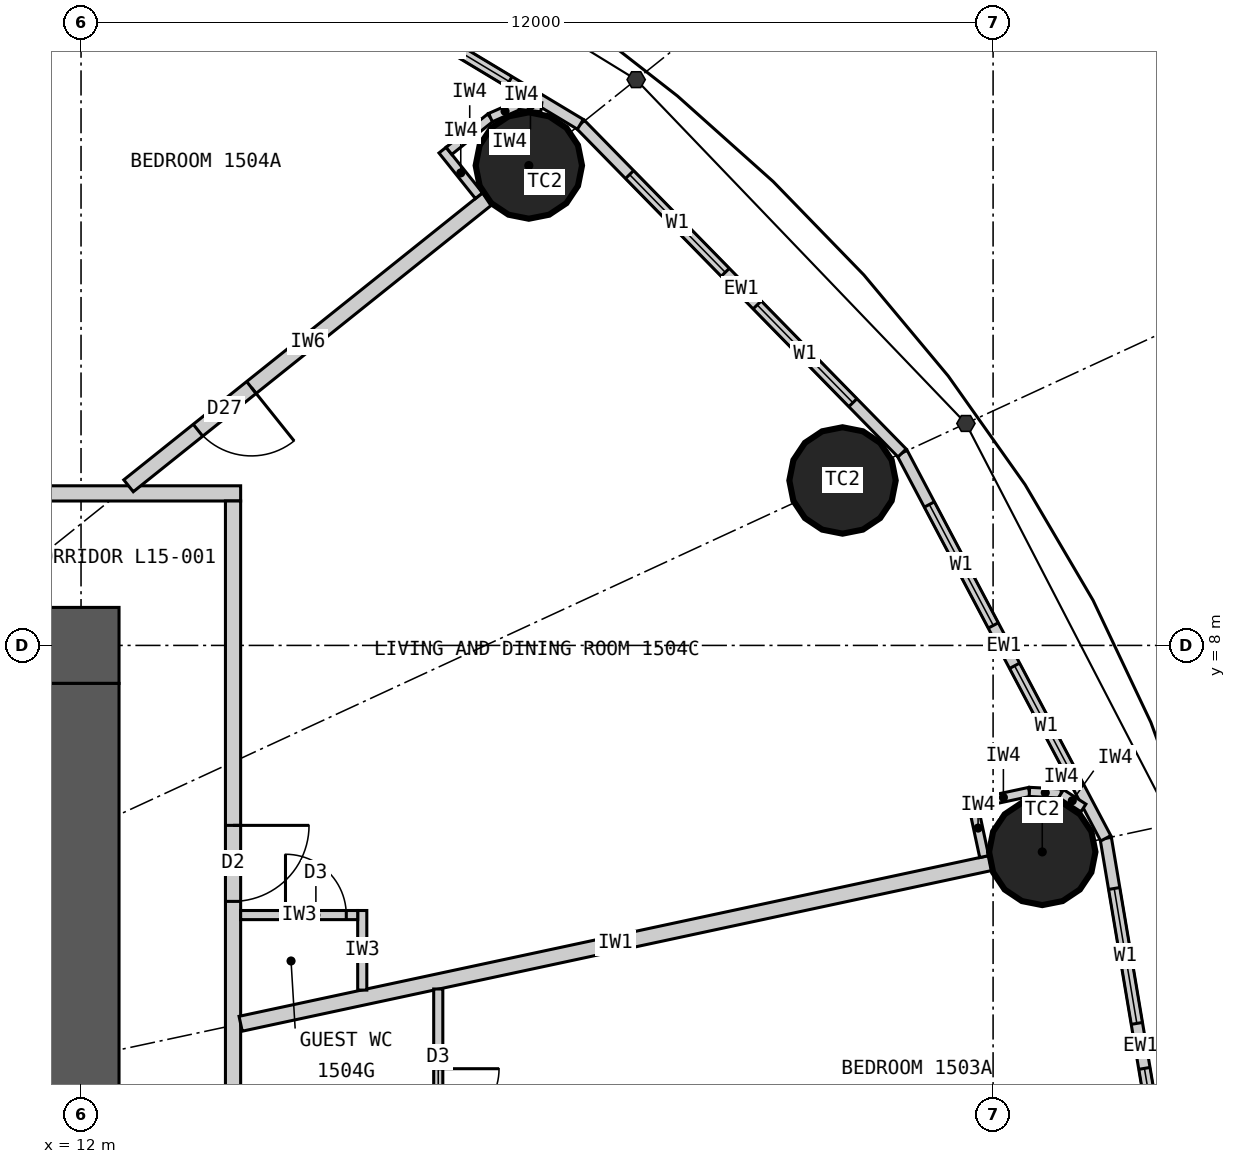
"""IFC4 building model, lengths in metres.
Left out: names, types, materials, properties, quantities, classifications, styles, units other than length and angle.
Written with IfcOpenShell. Run it as: python <this file> out.ifc"""

import sys

from ifc_helpers import new_model, si_unit, direction, frame, frame_2d, origin, origin_2d, place, context, subcontext, project, spatial, rectangle, circle, extrude, element, fill, save


model = new_model("IFC4")
c1 = context("Model", 3, precision=1e-05, world=origin(), true_north=direction((0.0, 1.0)))
c2 = subcontext(c1, "Body", "Model", "MODEL_VIEW")
j1 = project(units=[si_unit("LENGTHUNIT", "METRE"), si_unit("PLANEANGLEUNIT", "RADIAN")], contexts=[c1])
p1 = place(None, origin())
s1 = spatial("IfcSite", under=j1, at=p1, CompositionType="ELEMENT")
p2 = place(p1, origin())
s2 = spatial("IfcBuilding", under=s1, at=p2, CompositionType="ELEMENT")
p3 = place(p2, frame((0.0, 0.0, 63.9)))
s3 = spatial("IfcBuildingStorey", under=s2, at=p3, CompositionType="ELEMENT", Elevation=63.9)
for number, where, z_axis, x_axis in (
    (1, (24.647, 5.283, 0.0), (0.0, 0.0, 1.0), (1.0, 0.0, 0.0)),
    (2, (22.019, 10.17, 0.0), (0.0, 0.0, 1.0), (1.0, 0.0, 0.0)),
    (3, (17.892, 14.313, 0.0), (0.0, 0.0, 1.0), (1.0, 0.0, 0.0)),
):
    element("IfcColumn", number, at=place(p3, frame(where, z_axis=z_axis, x_axis=x_axis)), inside=s3, PredefinedType="COLUMN", context=c2, shape_type="SweptSolid", body=[
        extrude(circle(Radius=0.7, at=origin_2d()), origin(), (0.0, 0.0, 1.0), 3.3),
    ])
p4 = place(p3, frame((-12.5, 8.0, 0.0), z_axis=(0.0, 0.0, 1.0), x_axis=(1.0, 0.0, 0.0)))
e4 = element("IfcWall", 4, at=p4, inside=s3, PredefinedType="SHEAR", context=c2, shape_type="SweptSolid", body=[
    extrude(rectangle(XDim=25.0, YDim=1.0, at=frame_2d((12.5, 0.0))), origin(), (0.0, 0.0, 1.0), 3.3),
])
p5 = place(p4, frame((11.2, 0.0, 0.0)))
e5 = element("IfcOpeningElement", 5, at=p5, cuts=e4, PredefinedType="OPENING", context=c2, shape_type="SweptSolid", body=[
    extrude(rectangle(XDim=1.2, YDim=2.2, at=frame_2d((0.6, 1.1))), frame((0.0, 0.51, 0.0), z_axis=(0.0, -1.0, 0.0), x_axis=(1.0, 0.0, 0.0)), (0.0, 0.0, 1.0), 1.02),
])
p6 = place(p4, frame((18.8, 0.0, 0.0)))
e6 = element("IfcOpeningElement", 6, at=p6, cuts=e4, PredefinedType="OPENING", context=c2, shape_type="SweptSolid", body=[
    extrude(rectangle(XDim=0.9, YDim=2.2, at=frame_2d((0.45, 1.1))), frame((0.0, 0.51, 0.0), z_axis=(0.0, -1.0, 0.0), x_axis=(1.0, 0.0, 0.0)), (0.0, 0.0, 1.0), 1.02),
])
p7 = place(p3, frame((12.0, -7.5, 0.0), z_axis=(0.0, 0.0, 1.0), x_axis=(0.0, 1.0, 0.0)))
e7 = element("IfcWall", 7, at=p7, inside=s3, PredefinedType="SHEAR", context=c2, shape_type="SweptSolid", body=[
    extrude(rectangle(XDim=15.0, YDim=1.0, at=frame_2d((7.5, 0.0))), origin(), (0.0, 0.0, 1.0), 3.3),
])
p8 = place(p7, frame((6.6, 0.0, 0.0)))
e8 = element("IfcOpeningElement", 8, at=p8, cuts=e7, PredefinedType="OPENING", context=c2, shape_type="SweptSolid", body=[
    extrude(rectangle(XDim=1.8, YDim=2.2, at=frame_2d((0.9, 1.1))), frame((0.0, 0.51, 0.0), z_axis=(0.0, -1.0, 0.0), x_axis=(1.0, 0.0, 0.0)), (0.0, 0.0, 1.0), 1.02),
])
p9 = place(p3, frame((26.4, 0.0, 0.0), z_axis=(0.0, 0.0, 1.0), x_axis=(-0.165642551694, 0.986185857264, 0.0)))
e9 = element("IfcWall", 9, at=p9, inside=s3, PredefinedType="ELEMENTEDWALL", context=c2, shape_type="SweptSolid", body=[
    extrude(rectangle(XDim=5.539, YDim=0.15, at=frame_2d((2.77, 0.0))), origin(), (0.0, 0.0, 1.0), 3.12),
])
p10 = place(p9, frame((0.669, 0.0, 0.9)))
e10 = element("IfcOpeningElement", 10, at=p10, cuts=e9, PredefinedType="OPENING", context=c2, shape_type="SweptSolid", body=[
    extrude(rectangle(XDim=1.8, YDim=1.9, at=frame_2d((0.9, 0.95))), frame((0.0, 0.085, 0.0), z_axis=(0.0, -1.0, 0.0), x_axis=(1.0, 0.0, 0.0)), (0.0, 0.0, 1.0), 0.17),
])
p11 = place(p9, frame((3.07, 0.0, 0.9)))
e11 = element("IfcOpeningElement", 11, at=p11, cuts=e9, PredefinedType="OPENING", context=c2, shape_type="SweptSolid", body=[
    extrude(rectangle(XDim=1.8, YDim=1.9, at=frame_2d((0.9, 0.95))), frame((0.0, 0.085, 0.0), z_axis=(0.0, -1.0, 0.0), x_axis=(1.0, 0.0, 0.0)), (0.0, 0.0, 1.0), 0.17),
])
p12 = place(p3, frame((25.482, 5.462, 0.0), z_axis=(0.0, 0.0, 1.0), x_axis=(-0.467296867008, 0.884100468321, 0.0)))
e12 = element("IfcWall", 12, at=p12, inside=s3, PredefinedType="ELEMENTEDWALL", context=c2, shape_type="SweptSolid", body=[
    extrude(rectangle(XDim=5.734, YDim=0.15, at=frame_2d((2.867, 0.0))), origin(), (0.0, 0.0, 1.0), 3.12),
])
p13 = place(p12, frame((0.767, 0.0, 0.9)))
e13 = element("IfcOpeningElement", 13, at=p13, cuts=e12, PredefinedType="OPENING", context=c2, shape_type="SweptSolid", body=[
    extrude(rectangle(XDim=1.8, YDim=1.9, at=frame_2d((0.9, 0.95))), frame((0.0, 0.085, 0.0), z_axis=(0.0, -1.0, 0.0), x_axis=(1.0, 0.0, 0.0)), (0.0, 0.0, 1.0), 0.17),
])
p14 = place(p12, frame((3.167, 0.0, 0.9)))
e14 = element("IfcOpeningElement", 14, at=p14, cuts=e12, PredefinedType="OPENING", context=c2, shape_type="SweptSolid", body=[
    extrude(rectangle(XDim=1.8, YDim=1.9, at=frame_2d((0.9, 0.95))), frame((0.0, 0.085, 0.0), z_axis=(0.0, -1.0, 0.0), x_axis=(1.0, 0.0, 0.0)), (0.0, 0.0, 1.0), 0.17),
])
p15 = place(p3, frame((22.803, 10.532, 0.0), z_axis=(0.0, 0.0, 1.0), x_axis=(-0.699602905915, 0.714531856557, 0.0)))
e15 = element("IfcWall", 15, at=p15, inside=s3, PredefinedType="ELEMENTEDWALL", context=c2, shape_type="SweptSolid", body=[
    extrude(rectangle(XDim=6.051, YDim=0.15, at=frame_2d((3.025, 0.0))), origin(), (0.0, 0.0, 1.0), 3.12),
])
p16 = place(p15, frame((0.926, 0.0, 0.9)))
e16 = element("IfcOpeningElement", 16, at=p16, cuts=e15, PredefinedType="OPENING", context=c2, shape_type="SweptSolid", body=[
    extrude(rectangle(XDim=1.8, YDim=1.9, at=frame_2d((0.9, 0.95))), frame((0.0, 0.085, 0.0), z_axis=(0.0, -1.0, 0.0), x_axis=(1.0, 0.0, 0.0)), (0.0, 0.0, 1.0), 0.17),
])
p17 = place(p15, frame((3.325, 0.0, 0.9)))
e17 = element("IfcOpeningElement", 17, at=p17, cuts=e15, PredefinedType="OPENING", context=c2, shape_type="SweptSolid", body=[
    extrude(rectangle(XDim=1.8, YDim=1.9, at=frame_2d((0.9, 0.95))), frame((0.0, 0.085, 0.0), z_axis=(0.0, -1.0, 0.0), x_axis=(1.0, 0.0, 0.0)), (0.0, 0.0, 1.0), 0.17),
])
p18 = place(p3, frame((18.57, 14.856, 0.0), z_axis=(0.0, 0.0, 1.0), x_axis=(-0.856983180864, 0.515344377787, 0.0)))
e18 = element("IfcWall", 18, at=p18, inside=s3, PredefinedType="ELEMENTEDWALL", context=c2, shape_type="SweptSolid", body=[
    extrude(rectangle(XDim=6.386, YDim=0.15, at=frame_2d((3.193, 0.0))), origin(), (0.0, 0.0, 1.0), 3.12),
])
p19 = place(p18, frame((1.093, 0.0, 0.9)))
e19 = element("IfcOpeningElement", 19, at=p19, cuts=e18, PredefinedType="OPENING", context=c2, shape_type="SweptSolid", body=[
    extrude(rectangle(XDim=1.8, YDim=1.9, at=frame_2d((0.9, 0.95))), frame((0.0, 0.085, 0.0), z_axis=(0.0, -1.0, 0.0), x_axis=(1.0, 0.0, 0.0)), (0.0, 0.0, 1.0), 0.17),
])
p20 = place(p18, frame((3.493, 0.0, 0.9)))
e20 = element("IfcOpeningElement", 20, at=p20, cuts=e18, PredefinedType="OPENING", context=c2, shape_type="SweptSolid", body=[
    extrude(rectangle(XDim=1.8, YDim=1.9, at=frame_2d((0.9, 0.95))), frame((0.0, 0.085, 0.0), z_axis=(0.0, -1.0, 0.0), x_axis=(1.0, 0.0, 0.0)), (0.0, 0.0, 1.0), 0.17),
])
p21 = place(p3, frame((-14.1, 10.0, 0.0), z_axis=(0.0, 0.0, 1.0), x_axis=(1.0, 0.0, 0.0)))
e21 = element("IfcWall", 21, at=p21, inside=s3, PredefinedType="PARTITIONING", context=c2, shape_type="SweptSolid", body=[
    extrude(rectangle(XDim=28.2, YDim=0.2, at=frame_2d((14.1, 0.0))), origin(), (0.0, 0.0, 1.0), 3.12),
])
p22 = place(p21, frame((18.529, 0.0, 0.0)))
e22 = element("IfcOpeningElement", 22, at=p22, cuts=e21, PredefinedType="OPENING", context=c2, shape_type="SweptSolid", body=[
    extrude(rectangle(XDim=1.0, YDim=2.2, at=frame_2d((0.5, 1.1))), frame((0.0, 0.11, 0.0), z_axis=(0.0, -1.0, 0.0), x_axis=(1.0, 0.0, 0.0)), (0.0, 0.0, 1.0), 0.22),
])
p23 = place(p21, frame((14.623, 0.0, 0.0)))
e23 = element("IfcOpeningElement", 23, at=p23, cuts=e21, PredefinedType="OPENING", context=c2, shape_type="SweptSolid", body=[
    extrude(rectangle(XDim=1.0, YDim=2.2, at=frame_2d((0.5, 1.1))), frame((0.0, 0.11, 0.0), z_axis=(0.0, -1.0, 0.0), x_axis=(1.0, 0.0, 0.0)), (0.0, 0.0, 1.0), 0.22),
])
p24 = place(p21, frame((11.24, 0.0, 0.0)))
e24 = element("IfcOpeningElement", 24, at=p24, cuts=e21, PredefinedType="OPENING", context=c2, shape_type="SweptSolid", body=[
    extrude(rectangle(XDim=1.0, YDim=2.2, at=frame_2d((0.5, 1.1))), frame((0.0, 0.11, 0.0), z_axis=(0.0, -1.0, 0.0), x_axis=(1.0, 0.0, 0.0)), (0.0, 0.0, 1.0), 0.22),
])
p25 = place(p21, frame((8.671, 0.0, 0.0)))
e25 = element("IfcOpeningElement", 25, at=p25, cuts=e21, PredefinedType="OPENING", context=c2, shape_type="SweptSolid", body=[
    extrude(rectangle(XDim=1.0, YDim=2.2, at=frame_2d((0.5, 1.1))), frame((0.0, 0.11, 0.0), z_axis=(0.0, -1.0, 0.0), x_axis=(1.0, 0.0, 0.0)), (0.0, 0.0, 1.0), 0.22),
])
p26 = place(p21, frame((2.801, 0.0, 0.0)))
e26 = element("IfcOpeningElement", 26, at=p26, cuts=e21, PredefinedType="OPENING", context=c2, shape_type="SweptSolid", body=[
    extrude(rectangle(XDim=1.0, YDim=2.2, at=frame_2d((0.5, 1.1))), frame((0.0, 0.11, 0.0), z_axis=(0.0, -1.0, 0.0), x_axis=(1.0, 0.0, 0.0)), (0.0, 0.0, 1.0), 0.22),
])
p27 = place(p3, frame((14.0, -9.9, 0.0), z_axis=(0.0, 0.0, 1.0), x_axis=(0.0, 1.0, 0.0)))
e27 = element("IfcWall", 27, at=p27, inside=s3, PredefinedType="PARTITIONING", context=c2, shape_type="SweptSolid", body=[
    extrude(rectangle(XDim=19.8, YDim=0.2, at=frame_2d((9.9, 0.0))), origin(), (0.0, 0.0, 1.0), 3.12),
])
p28 = place(p27, frame((0.103, 0.0, 0.0)))
e28 = element("IfcOpeningElement", 28, at=p28, cuts=e27, PredefinedType="OPENING", context=c2, shape_type="SweptSolid", body=[
    extrude(rectangle(XDim=1.0, YDim=2.2, at=frame_2d((0.5, 1.1))), frame((0.0, 0.11, 0.0), z_axis=(0.0, -1.0, 0.0), x_axis=(1.0, 0.0, 0.0)), (0.0, 0.0, 1.0), 0.22),
])
p29 = place(p27, frame((5.248, 0.0, 0.0)))
e29 = element("IfcOpeningElement", 29, at=p29, cuts=e27, PredefinedType="OPENING", context=c2, shape_type="SweptSolid", body=[
    extrude(rectangle(XDim=1.0, YDim=2.2, at=frame_2d((0.5, 1.1))), frame((0.0, 0.11, 0.0), z_axis=(0.0, -1.0, 0.0), x_axis=(1.0, 0.0, 0.0)), (0.0, 0.0, 1.0), 0.22),
])
p30 = place(p27, frame((8.438, 0.0, 0.0)))
e30 = element("IfcOpeningElement", 30, at=p30, cuts=e27, PredefinedType="OPENING", context=c2, shape_type="SweptSolid", body=[
    extrude(rectangle(XDim=1.0, YDim=2.2, at=frame_2d((0.5, 1.1))), frame((0.0, 0.11, 0.0), z_axis=(0.0, -1.0, 0.0), x_axis=(1.0, 0.0, 0.0)), (0.0, 0.0, 1.0), 0.22),
])
p31 = place(p27, frame((14.532, 0.0, 0.0)))
e31 = element("IfcOpeningElement", 31, at=p31, cuts=e27, PredefinedType="OPENING", context=c2, shape_type="SweptSolid", body=[
    extrude(rectangle(XDim=1.0, YDim=2.2, at=frame_2d((0.5, 1.1))), frame((0.0, 0.11, 0.0), z_axis=(0.0, -1.0, 0.0), x_axis=(1.0, 0.0, 0.0)), (0.0, 0.0, 1.0), 0.22),
])
p32 = place(p3, frame((14.1, 3.022, 0.0), z_axis=(0.0, 0.0, 1.0), x_axis=(0.977790014929, 0.209586943072, 0.0)))
e32 = element("IfcWall", 32, at=p32, inside=s3, PredefinedType="PARTITIONING", context=c2, shape_type="SweptSolid", body=[
    extrude(rectangle(XDim=10.087, YDim=0.2, at=frame_2d((5.043, 0.0))), origin(), (0.0, 0.0, 1.0), 2.32),
])
p33 = place(p3, frame((12.625, 10.1, 0.0), z_axis=(0.0, 0.0, 1.0), x_axis=(0.780892451574, 0.624665493744, 0.0)))
e33 = element("IfcWall", 33, at=p33, inside=s3, PredefinedType="PARTITIONING", context=c2, shape_type="SweptSolid", body=[
    extrude(rectangle(XDim=6.045, YDim=0.2, at=frame_2d((3.022, 0.0))), origin(), (0.0, 0.0, 1.0), 2.32),
])
p34 = place(p33, frame((1.17, 0.0, 0.0)))
e34 = element("IfcOpeningElement", 34, at=p34, cuts=e33, PredefinedType="OPENING", context=c2, shape_type="SweptSolid", body=[
    extrude(rectangle(XDim=0.9, YDim=2.1, at=frame_2d((0.45, 1.05))), frame((0.0, 0.11, 0.0), z_axis=(0.0, -1.0, 0.0), x_axis=(1.0, 0.0, 0.0)), (0.0, 0.0, 1.0), 0.22),
])
p35 = place(p3, frame((7.289, 10.1, 0.0), z_axis=(0.0, 0.0, 1.0), x_axis=(0.585198353053, 0.810890182197, 0.0)))
e35 = element("IfcWall", 35, at=p35, inside=s3, PredefinedType="PARTITIONING", context=c2, shape_type="SweptSolid", body=[
    extrude(rectangle(XDim=8.36, YDim=0.2, at=frame_2d((4.18, 0.0))), origin(), (0.0, 0.0, 1.0), 2.32),
])
p36 = place(p3, frame((16.7, 3.48, 0.0), z_axis=(0.0, 0.0, 1.0), x_axis=(0.0, -1.0, 0.0)))
e36 = element("IfcWall", 36, at=p36, inside=s3, PredefinedType="PARTITIONING", context=c2, shape_type="SweptSolid", body=[
    extrude(rectangle(XDim=2.897, YDim=0.12, at=frame_2d((1.449, 0.0))), origin(), (0.0, 0.0, 1.0), 3.12),
])
p37 = place(p36, frame((1.049, 0.0, 0.0)))
e37 = element("IfcOpeningElement", 37, at=p37, cuts=e36, PredefinedType="OPENING", context=c2, shape_type="SweptSolid", body=[
    extrude(rectangle(XDim=0.8, YDim=2.1, at=frame_2d((0.4, 1.05))), frame((0.0, 0.07, 0.0), z_axis=(0.0, -1.0, 0.0), x_axis=(1.0, 0.0, 0.0)), (0.0, 0.0, 1.0), 0.14),
])
p38 = place(p3, frame((15.7, 3.465, 0.0), z_axis=(0.0, 0.0, 1.0), x_axis=(0.0, 1.0, 0.0)))
e38 = element("IfcWall", 38, at=p38, inside=s3, PredefinedType="PARTITIONING", context=c2, shape_type="SweptSolid", body=[
    extrude(rectangle(XDim=1.047, YDim=0.12, at=frame_2d((0.523, 0.0))), origin(), (0.0, 0.0, 1.0), 3.12),
])
p39 = place(p3, frame((14.1, 4.452, 0.0), z_axis=(0.0, 0.0, 1.0), x_axis=(1.0, 0.0, 0.0)))
e39 = element("IfcWall", 39, at=p39, inside=s3, PredefinedType="PARTITIONING", context=c2, shape_type="SweptSolid", body=[
    extrude(rectangle(XDim=1.54, YDim=0.12, at=frame_2d((0.77, 0.0))), origin(), (0.0, 0.0, 1.0), 3.12),
])
p40 = place(p39, frame((0.59, 0.0, 0.0)))
e40 = element("IfcOpeningElement", 40, at=p40, cuts=e39, PredefinedType="OPENING", context=c2, shape_type="SweptSolid", body=[
    extrude(rectangle(XDim=0.8, YDim=2.1, at=frame_2d((0.4, 1.05))), frame((0.0, 0.07, 0.0), z_axis=(0.0, -1.0, 0.0), x_axis=(1.0, 0.0, 0.0)), (0.0, 0.0, 1.0), 0.14),
])
p41 = place(p3, frame((23.883, 5.222, 0.0), z_axis=(0.0, 0.0, 1.0), x_axis=(-0.209311842415, 0.977848941619, 0.0)))
e41 = element("IfcWall", 41, at=p41, inside=s3, PredefinedType="PARTITIONING", context=c2, shape_type="SweptSolid", body=[
    extrude(rectangle(XDim=0.768, YDim=0.12, at=frame_2d((0.384, 0.0))), origin(), (0.0, 0.0, 1.0), 3.12),
])
p42 = place(p3, frame((23.793, 5.926, 0.0), z_axis=(0.0, 0.0, 1.0), x_axis=(0.977792206673, 0.209576717621, 0.0)))
e42 = element("IfcWall", 42, at=p42, inside=s3, PredefinedType="PARTITIONING", context=c2, shape_type="SweptSolid", body=[
    extrude(rectangle(XDim=0.7, YDim=0.12, at=frame_2d((0.35, 0.0))), origin(), (0.0, 0.0, 1.0), 3.12),
])
p43 = place(p3, frame((24.478, 6.073, 0.0), z_axis=(0.0, 0.0, 1.0), x_axis=(0.998708262812, -0.05081147302, 0.0)))
e43 = element("IfcWall", 43, at=p43, inside=s3, PredefinedType="PARTITIONING", context=c2, shape_type="SweptSolid", body=[
    extrude(rectangle(XDim=0.418, YDim=0.12, at=frame_2d((0.209, 0.0))), origin(), (0.0, 0.0, 1.0), 3.12),
])
p44 = place(p3, frame((24.895, 6.052, 0.0), z_axis=(0.0, 0.0, 1.0), x_axis=(0.839495197275, -0.54336710772, 0.0)))
e44 = element("IfcWall", 44, at=p44, inside=s3, PredefinedType="PARTITIONING", context=c2, shape_type="SweptSolid", body=[
    extrude(rectangle(XDim=0.35, YDim=0.12, at=frame_2d((0.175, 0.0))), origin(), (0.0, 0.0, 1.0), 3.12),
])
p45 = place(p3, frame((17.236, 13.917, 0.0), z_axis=(0.0, 0.0, 1.0), x_axis=(-0.624695047554, 0.780868809443, 0.0)))
e45 = element("IfcWall", 45, at=p45, inside=s3, PredefinedType="PARTITIONING", context=c2, shape_type="SweptSolid", body=[
    extrude(rectangle(XDim=0.768, YDim=0.12, at=frame_2d((0.384, 0.0))), origin(), (0.0, 0.0, 1.0), 3.12),
])
p46 = place(p3, frame((16.841, 14.507, 0.0), z_axis=(0.0, 0.0, 1.0), x_axis=(0.780902834923, 0.62465251333, 0.0)))
e46 = element("IfcWall", 46, at=p46, inside=s3, PredefinedType="PARTITIONING", context=c2, shape_type="SweptSolid", body=[
    extrude(rectangle(XDim=0.7, YDim=0.12, at=frame_2d((0.35, 0.0))), origin(), (0.0, 0.0, 1.0), 3.12),
])
p47 = place(p3, frame((17.387, 14.944, 0.0), z_axis=(0.0, 0.0, 1.0), x_axis=(0.916036698064, 0.401094462441, 0.0)))
e47 = element("IfcWall", 47, at=p47, inside=s3, PredefinedType="PARTITIONING", context=c2, shape_type="SweptSolid", body=[
    extrude(rectangle(XDim=0.418, YDim=0.12, at=frame_2d((0.209, 0.0))), origin(), (0.0, 0.0, 1.0), 3.12),
])
p48 = place(p3, frame((17.77, 15.112, 0.0), z_axis=(0.0, 0.0, 1.0), x_axis=(0.993904401174, -0.110245368731, 0.0)))
e48 = element("IfcWall", 48, at=p48, inside=s3, PredefinedType="PARTITIONING", context=c2, shape_type="SweptSolid", body=[
    extrude(rectangle(XDim=0.288, YDim=0.12, at=frame_2d((0.144, 0.0))), origin(), (0.0, 0.0, 1.0), 3.12),
])
p49 = place(p10, origin())
e49 = element("IfcWindow", 49, at=p49, inside=s3, PartitioningType="SINGLE_PANEL", PredefinedType="WINDOW", context=c2, shape_type="SweptSolid", body=[
    extrude(rectangle(XDim=1.8, YDim=1.9, at=frame_2d((0.9, 0.95))), frame((0.0, 0.03, 0.0), z_axis=(0.0, -1.0, 0.0), x_axis=(1.0, 0.0, 0.0)), (0.0, 0.0, 1.0), 0.06),
])
fill(e10, e49)
p50 = place(p11, origin())
e50 = element("IfcWindow", 50, at=p50, inside=s3, PartitioningType="SINGLE_PANEL", PredefinedType="WINDOW", context=c2, shape_type="SweptSolid", body=[
    extrude(rectangle(XDim=1.8, YDim=1.9, at=frame_2d((0.9, 0.95))), frame((0.0, 0.03, 0.0), z_axis=(0.0, -1.0, 0.0), x_axis=(1.0, 0.0, 0.0)), (0.0, 0.0, 1.0), 0.06),
])
fill(e11, e50)
p51 = place(p13, origin())
e51 = element("IfcWindow", 51, at=p51, inside=s3, PartitioningType="SINGLE_PANEL", PredefinedType="WINDOW", context=c2, shape_type="SweptSolid", body=[
    extrude(rectangle(XDim=1.8, YDim=1.9, at=frame_2d((0.9, 0.95))), frame((0.0, 0.03, 0.0), z_axis=(0.0, -1.0, 0.0), x_axis=(1.0, 0.0, 0.0)), (0.0, 0.0, 1.0), 0.06),
])
fill(e13, e51)
p52 = place(p14, origin())
e52 = element("IfcWindow", 52, at=p52, inside=s3, PartitioningType="SINGLE_PANEL", PredefinedType="WINDOW", context=c2, shape_type="SweptSolid", body=[
    extrude(rectangle(XDim=1.8, YDim=1.9, at=frame_2d((0.9, 0.95))), frame((0.0, 0.03, 0.0), z_axis=(0.0, -1.0, 0.0), x_axis=(1.0, 0.0, 0.0)), (0.0, 0.0, 1.0), 0.06),
])
fill(e14, e52)
p53 = place(p16, origin())
e53 = element("IfcWindow", 53, at=p53, inside=s3, PartitioningType="SINGLE_PANEL", PredefinedType="WINDOW", context=c2, shape_type="SweptSolid", body=[
    extrude(rectangle(XDim=1.8, YDim=1.9, at=frame_2d((0.9, 0.95))), frame((0.0, 0.03, 0.0), z_axis=(0.0, -1.0, 0.0), x_axis=(1.0, 0.0, 0.0)), (0.0, 0.0, 1.0), 0.06),
])
fill(e16, e53)
p54 = place(p17, origin())
e54 = element("IfcWindow", 54, at=p54, inside=s3, PartitioningType="SINGLE_PANEL", PredefinedType="WINDOW", context=c2, shape_type="SweptSolid", body=[
    extrude(rectangle(XDim=1.8, YDim=1.9, at=frame_2d((0.9, 0.95))), frame((0.0, 0.03, 0.0), z_axis=(0.0, -1.0, 0.0), x_axis=(1.0, 0.0, 0.0)), (0.0, 0.0, 1.0), 0.06),
])
fill(e17, e54)
p55 = place(p19, origin())
e55 = element("IfcWindow", 55, at=p55, inside=s3, PartitioningType="SINGLE_PANEL", PredefinedType="WINDOW", context=c2, shape_type="SweptSolid", body=[
    extrude(rectangle(XDim=1.8, YDim=1.9, at=frame_2d((0.9, 0.95))), frame((0.0, 0.03, 0.0), z_axis=(0.0, -1.0, 0.0), x_axis=(1.0, 0.0, 0.0)), (0.0, 0.0, 1.0), 0.06),
])
fill(e19, e55)
p56 = place(p37, origin())
e56 = element("IfcDoor", 56, at=p56, inside=s3, OperationType="SINGLE_SWING_LEFT", PredefinedType="DOOR", context=c2, shape_type="SweptSolid", body=[
    extrude(rectangle(XDim=0.8, YDim=2.1, at=frame_2d((0.4, 1.05))), frame((0.0, 0.025, 0.0), z_axis=(0.0, -1.0, 0.0), x_axis=(1.0, 0.0, 0.0)), (0.0, 0.0, 1.0), 0.05),
])
fill(e37, e56)
p57 = place(p40, origin())
e57 = element("IfcDoor", 57, at=p57, inside=s3, OperationType="SINGLE_SWING_LEFT", PredefinedType="DOOR", context=c2, shape_type="SweptSolid", body=[
    extrude(rectangle(XDim=0.8, YDim=2.1, at=frame_2d((0.4, 1.05))), frame((0.0, 0.025, 0.0), z_axis=(0.0, -1.0, 0.0), x_axis=(1.0, 0.0, 0.0)), (0.0, 0.0, 1.0), 0.05),
])
fill(e40, e57)
p58 = place(p31, origin())
e58 = element("IfcDoor", 58, at=p58, inside=s3, OperationType="SINGLE_SWING_RIGHT", PredefinedType="DOOR", context=c2, shape_type="SweptSolid", body=[
    extrude(rectangle(XDim=1.0, YDim=2.2, at=frame_2d((0.5, 1.1))), frame((0.0, 0.025, 0.0), z_axis=(0.0, -1.0, 0.0), x_axis=(1.0, 0.0, 0.0)), (0.0, 0.0, 1.0), 0.05),
])
fill(e31, e58)
p59 = place(p34, origin())
e59 = element("IfcDoor", 59, at=p59, inside=s3, OperationType="SINGLE_SWING_RIGHT", PredefinedType="DOOR", context=c2, shape_type="SweptSolid", body=[
    extrude(rectangle(XDim=0.9, YDim=2.1, at=frame_2d((0.45, 1.05))), frame((0.0, 0.025, 0.0), z_axis=(0.0, -1.0, 0.0), x_axis=(1.0, 0.0, 0.0)), (0.0, 0.0, 1.0), 0.05),
])
fill(e34, e59)
save(model, sys.argv[1])
